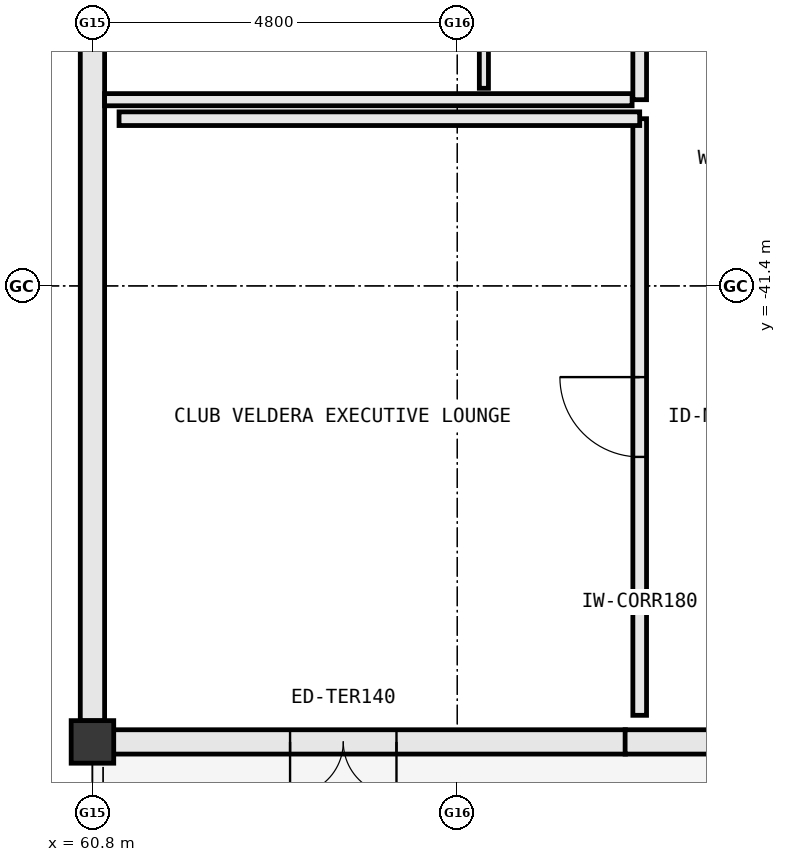
"""IFC4 building model, lengths in metres.
Left out: names, types, materials, properties, quantities, classifications, styles, units other than length and angle.
Written with IfcOpenShell. Run it as: python <this file> out.ifc"""

import sys

from ifc_helpers import new_model, si_unit, direction, frame, frame_2d, origin, origin_2d, place, context, subcontext, project, spatial, rectangle, extrude, element, fill, save


model = new_model("IFC4")
c1 = context("Model", 3, precision=1e-05, world=origin(), true_north=direction((0.0, 1.0)))
c2 = subcontext(c1, "Body", "Model", "MODEL_VIEW")
j1 = project(units=[si_unit("LENGTHUNIT", "METRE"), si_unit("PLANEANGLEUNIT", "RADIAN")], contexts=[c1])
p1 = place(None, origin())
s1 = spatial("IfcSite", under=j1, at=p1, CompositionType="ELEMENT")
p2 = place(p1, origin())
s2 = spatial("IfcBuilding", under=s1, at=p2, CompositionType="ELEMENT")
p3 = place(p2, frame((0.0, 0.0, 16.2)))
s3 = spatial("IfcBuildingStorey", under=s2, at=p3, CompositionType="ELEMENT", Elevation=16.2)
p4 = place(p3, frame((60.8, -47.4, 0.0), z_axis=(0.0, 0.0, 1.0), x_axis=(1.0, 0.0, 0.0)))
e1 = element("IfcColumn", 1, at=p4, inside=s3, PredefinedType="COLUMN", context=c2, shape_type="SweptSolid", body=[
    extrude(rectangle(XDim=0.56, YDim=0.56, at=origin_2d()), origin(), (0.0, 0.0, 1.0), 3.8),
])
p5 = place(p3, frame((61.078, -47.4, 0.0), z_axis=(0.0, 0.0, 1.0), x_axis=(1.0, 0.0, 0.0)))
e2 = element("IfcWall", 2, at=p5, inside=s3, PredefinedType="STANDARD", context=c2, shape_type="SweptSolid", body=[
    extrude(rectangle(XDim=6.734, YDim=0.32, at=frame_2d((3.367, 0.0))), origin(), (0.0, 0.0, 1.0), 2.695),
])
p6 = place(p5, frame((2.322, 0.0, 0.0)))
e3 = element("IfcOpeningElement", 3, at=p6, cuts=e2, PredefinedType="OPENING", context=c2, shape_type="SweptSolid", body=[
    extrude(rectangle(XDim=1.4, YDim=2.2, at=frame_2d((0.7, 1.1))), frame((0.0, 0.172, 0.0), z_axis=(0.0, -1.0, 0.0), x_axis=(1.0, 0.0, 0.0)), (0.0, 0.0, 1.0), 0.344),
])
p7 = place(p3, frame((67.808, -47.4, 0.0), z_axis=(0.0, 0.0, 1.0), x_axis=(1.0, 0.0, 0.0)))
e4 = element("IfcWall", 4, at=p7, inside=s3, PredefinedType="STANDARD", context=c2, shape_type="SweptSolid", body=[
    extrude(rectangle(XDim=6.734, YDim=0.32, at=frame_2d((3.367, 0.0))), origin(), (0.0, 0.0, 1.0), 2.695),
])
p8 = place(p3, frame((60.8, -38.078, 0.0), z_axis=(0.0, 0.0, 1.0), x_axis=(0.0, -1.0, 0.0)))
e5 = element("IfcWall", 5, at=p8, inside=s3, PredefinedType="STANDARD", context=c2, shape_type="SweptSolid", body=[
    extrude(rectangle(XDim=9.044, YDim=0.32, at=frame_2d((4.522, 0.0))), origin(), (0.0, 0.0, 1.0), 2.915),
])
p9 = place(p3, frame((68.0, -47.05, 0.0), z_axis=(0.0, 0.0, 1.0), x_axis=(0.0, 1.0, 0.0)))
e6 = element("IfcWall", 6, at=p9, inside=s3, PredefinedType="PARTITIONING", context=c2, shape_type="SweptSolid", body=[
    extrude(rectangle(XDim=7.85, YDim=0.18, at=frame_2d((3.925, 0.0))), origin(), (0.0, 0.0, 1.0), 3.56),
])
p10 = place(p9, frame((3.4, 0.0, 0.0)))
e7 = element("IfcOpeningElement", 7, at=p10, cuts=e6, PredefinedType="OPENING", context=c2, shape_type="SweptSolid", body=[
    extrude(rectangle(XDim=1.05, YDim=2.2, at=frame_2d((0.525, 1.1))), frame((0.0, 0.102, 0.0), z_axis=(0.0, -1.0, 0.0), x_axis=(1.0, 0.0, 0.0)), (0.0, 0.0, 1.0), 0.204),
])
p11 = place(p3, frame((68.0, -39.2, 0.0), z_axis=(0.0, 0.0, 1.0), x_axis=(-1.0, 0.0, 0.0)))
e8 = element("IfcWall", 8, at=p11, inside=s3, PredefinedType="PARTITIONING", context=c2, shape_type="SweptSolid", body=[
    extrude(rectangle(XDim=6.85, YDim=0.18, at=frame_2d((3.425, 0.0))), origin(), (0.0, 0.0, 1.0), 3.56),
])
p12 = place(p3, frame((68.0, -38.95, 0.0), z_axis=(0.0, 0.0, 1.0), x_axis=(0.0, 1.0, 0.0)))
e9 = element("IfcWall", 9, at=p12, inside=s3, PredefinedType="PARTITIONING", context=c2, shape_type="SweptSolid", body=[
    extrude(rectangle(XDim=3.28, YDim=0.18, at=frame_2d((1.64, 0.0))), origin(), (0.0, 0.0, 1.0), 3.56),
])
p13 = place(p12, frame((2.0, 0.0, 0.0)))
e10 = element("IfcOpeningElement", 10, at=p13, cuts=e9, PredefinedType="OPENING", context=c2, shape_type="SweptSolid", body=[
    extrude(rectangle(XDim=1.0, YDim=2.2, at=frame_2d((0.5, 1.1))), frame((0.0, 0.102, 0.0), z_axis=(0.0, -1.0, 0.0), x_axis=(1.0, 0.0, 0.0)), (0.0, 0.0, 1.0), 0.204),
])
p14 = place(p3, frame((60.96, -38.95, 0.0), z_axis=(0.0, 0.0, 1.0), x_axis=(1.0, 0.0, 0.0)))
e11 = element("IfcWall", 11, at=p14, inside=s3, PredefinedType="PARTITIONING", context=c2, shape_type="SweptSolid", body=[
    extrude(rectangle(XDim=6.94, YDim=0.16, at=frame_2d((3.47, 0.0))), origin(), (0.0, 0.0, 1.0), 3.56),
])
p15 = place(p3, frame((65.95, -38.8, 0.0), z_axis=(0.0, 0.0, 1.0), x_axis=(0.0, 1.0, 0.0)))
e12 = element("IfcWall", 12, at=p15, inside=s3, PredefinedType="PARTITIONING", context=c2, shape_type="SweptSolid", body=[
    extrude(rectangle(XDim=1.75, YDim=0.12, at=frame_2d((0.875, 0.0))), origin(), (0.0, 0.0, 1.0), 2.915),
])
p16 = place(p6, frame((1.4, 0.0, 0.0), z_axis=(0.0, 0.0, 1.0), x_axis=(-1.0, 0.0, 0.0)))
e13 = element("IfcDoor", 13, at=p16, inside=s3, OperationType="DOUBLE_DOOR_SINGLE_SWING", PredefinedType="DOOR", context=c2, shape_type="SweptSolid", body=[
    extrude(rectangle(XDim=1.4, YDim=2.2, at=frame_2d((0.7, 1.1))), frame((0.0, 0.025, 0.0), z_axis=(0.0, -1.0, 0.0), x_axis=(1.0, 0.0, 0.0)), (0.0, 0.0, 1.0), 0.05),
])
fill(e3, e13)
p17 = place(p10, origin())
e14 = element("IfcDoor", 14, at=p17, inside=s3, OperationType="SINGLE_SWING_RIGHT", PredefinedType="DOOR", context=c2, shape_type="SweptSolid", body=[
    extrude(rectangle(XDim=1.05, YDim=2.2, at=frame_2d((0.525, 1.1))), frame((0.0, 0.025, 0.0), z_axis=(0.0, -1.0, 0.0), x_axis=(1.0, 0.0, 0.0)), (0.0, 0.0, 1.0), 0.05),
])
fill(e7, e14)
save(model, sys.argv[1])
